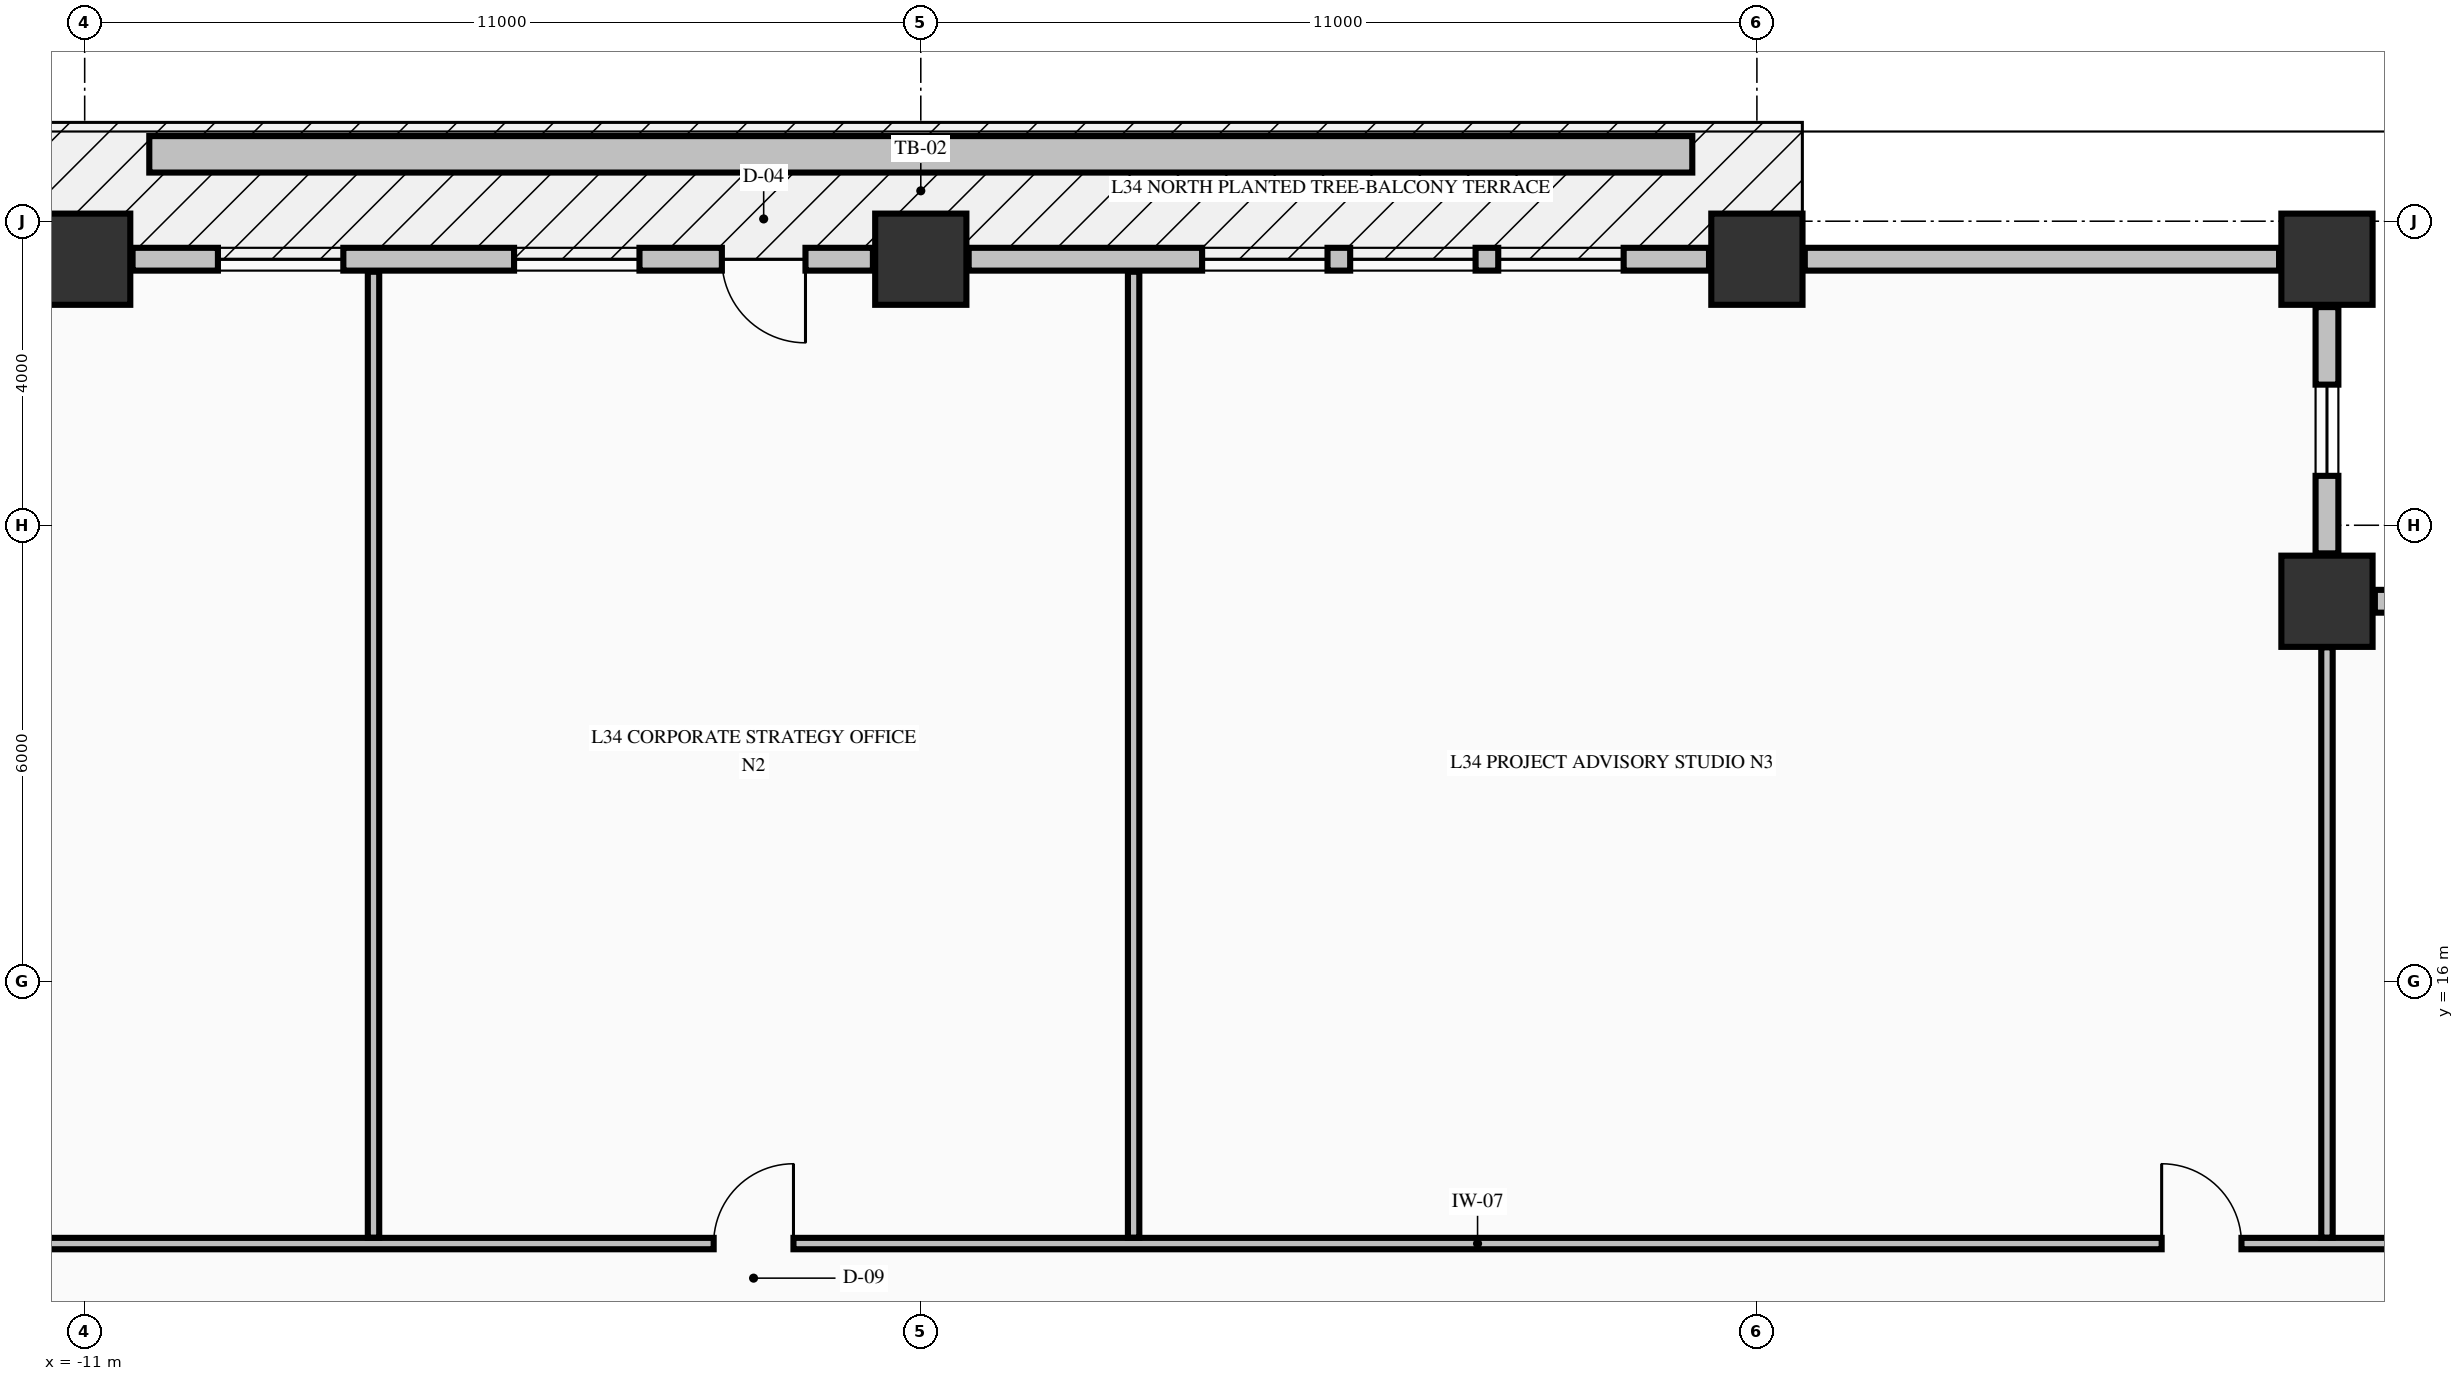
"""IFC4 building model, lengths in metres.
Left out: names, types, materials, properties, quantities, classifications, styles, units other than length and angle.
Written with IfcOpenShell. Run it as: python <this file> out.ifc"""

import sys

from ifc_helpers import new_model, si_unit, direction, frame, frame_2d, origin, origin_2d, place, context, subcontext, project, spatial, rectangle, extrude, element, fill, save


model = new_model("IFC4")
c1 = context("Model", 3, precision=1e-05, world=origin(), true_north=direction((0.0, 1.0)))
c2 = subcontext(c1, "Body", "Model", "MODEL_VIEW")
j1 = project(units=[si_unit("LENGTHUNIT", "METRE"), si_unit("PLANEANGLEUNIT", "RADIAN")], contexts=[c1])
p1 = place(None, origin())
s1 = spatial("IfcSite", under=j1, at=p1, CompositionType="ELEMENT")
p2 = place(p1, origin())
s2 = spatial("IfcBuilding", under=s1, at=p2, CompositionType="ELEMENT")
p3 = place(p2, frame((0.0, 0.0, 135.63)))
s3 = spatial("IfcBuildingStorey", under=s2, at=p3, CompositionType="ELEMENT", Elevation=135.63)
for number, where, z_axis, x_axis in (
    (1, (-11.0, 25.5, -0.25), (0.0, 0.0, 1.0), (1.0, 0.0, 0.0)),
    (2, (0.0, 25.5, -0.25), (0.0, 0.0, 1.0), (1.0, 0.0, 0.0)),
    (3, (11.0, 25.5, -0.25), (0.0, 0.0, 1.0), (1.0, 0.0, 0.0)),
    (4, (18.5, 25.5, -0.25), (0.0, 0.0, 1.0), (1.0, 0.0, 0.0)),
    (5, (18.5, 21.0, -0.25), (0.0, 0.0, 1.0), (1.0, 0.0, 0.0)),
):
    element("IfcColumn", number, at=place(p3, frame(where, z_axis=z_axis, x_axis=x_axis)), inside=s3, PredefinedType="COLUMN", context=c2, shape_type="SweptSolid", body=[
        extrude(rectangle(XDim=1.2, YDim=1.2, at=origin_2d()), origin(), (0.0, 0.0, 1.0), 3.57),
    ])
p4 = place(p3, frame((22.37, 21.0, 0.0), z_axis=(0.0, 0.0, 1.0), x_axis=(-1.0, 0.0, 0.0)))
e6 = element("IfcWall", 6, at=p4, inside=s3, PredefinedType="STANDARD", context=c2, shape_type="SweptSolid", body=[
    extrude(rectangle(XDim=3.24, YDim=0.3, at=frame_2d((1.62, 0.0))), origin(), (0.0, 0.0, 1.0), 2.712),
])
p5 = place(p4, frame((1.02, 0.0, 0.82)))
e7 = element("IfcOpeningElement", 7, at=p5, cuts=e6, PredefinedType="OPENING", context=c2, shape_type="SweptSolid", body=[
    extrude(rectangle(XDim=1.2, YDim=1.65, at=frame_2d((0.6, 0.825))), frame((0.0, 0.16, 0.0), z_axis=(0.0, -1.0, 0.0), x_axis=(1.0, 0.0, 0.0)), (0.0, 0.0, 1.0), 0.32),
])
p6 = place(p3, frame((18.5, 21.63, 0.0), z_axis=(0.0, 0.0, 1.0), x_axis=(0.0, 1.0, 0.0)))
e8 = element("IfcWall", 8, at=p6, inside=s3, PredefinedType="STANDARD", context=c2, shape_type="SweptSolid", body=[
    extrude(rectangle(XDim=3.24, YDim=0.3, at=frame_2d((1.62, 0.0))), origin(), (0.0, 0.0, 1.0), 2.712),
])
p7 = place(p6, frame((1.02, 0.0, 0.82)))
e9 = element("IfcOpeningElement", 9, at=p7, cuts=e8, PredefinedType="OPENING", context=c2, shape_type="SweptSolid", body=[
    extrude(rectangle(XDim=1.2, YDim=1.65, at=frame_2d((0.6, 0.825))), frame((0.0, 0.16, 0.0), z_axis=(0.0, -1.0, 0.0), x_axis=(1.0, 0.0, 0.0)), (0.0, 0.0, 1.0), 0.32),
])
p8 = place(p3, frame((-0.63, 25.5, 0.0), z_axis=(0.0, 0.0, 1.0), x_axis=(-1.0, 0.0, 0.0)))
e10 = element("IfcWall", 10, at=p8, inside=s3, PredefinedType="STANDARD", context=c2, shape_type="SweptSolid", body=[
    extrude(rectangle(XDim=9.74, YDim=0.3, at=frame_2d((4.87, 0.0))), origin(), (0.0, 0.0, 1.0), 2.712),
])
p9 = place(p8, frame((0.887, 0.0, 0.0)))
e11 = element("IfcOpeningElement", 11, at=p9, cuts=e10, PredefinedType="OPENING", context=c2, shape_type="SweptSolid", body=[
    extrude(rectangle(XDim=1.1, YDim=2.15, at=frame_2d((0.55, 1.075))), frame((0.0, 0.16, 0.0), z_axis=(0.0, -1.0, 0.0), x_axis=(1.0, 0.0, 0.0)), (0.0, 0.0, 1.0), 0.32),
])
p10 = place(p8, frame((3.071, 0.0, 0.8)))
e12 = element("IfcOpeningElement", 12, at=p10, cuts=e10, PredefinedType="OPENING", context=c2, shape_type="SweptSolid", body=[
    extrude(rectangle(XDim=1.65, YDim=1.7, at=frame_2d((0.825, 0.85))), frame((0.0, 0.16, 0.0), z_axis=(0.0, -1.0, 0.0), x_axis=(1.0, 0.0, 0.0)), (0.0, 0.0, 1.0), 0.32),
])
p11 = place(p8, frame((6.967, 0.0, 0.8)))
e13 = element("IfcOpeningElement", 13, at=p11, cuts=e10, PredefinedType="OPENING", context=c2, shape_type="SweptSolid", body=[
    extrude(rectangle(XDim=1.65, YDim=1.7, at=frame_2d((0.825, 0.85))), frame((0.0, 0.16, 0.0), z_axis=(0.0, -1.0, 0.0), x_axis=(1.0, 0.0, 0.0)), (0.0, 0.0, 1.0), 0.32),
])
p12 = place(p3, frame((10.37, 25.5, 0.0), z_axis=(0.0, 0.0, 1.0), x_axis=(-1.0, 0.0, 0.0)))
e14 = element("IfcWall", 14, at=p12, inside=s3, PredefinedType="STANDARD", context=c2, shape_type="SweptSolid", body=[
    extrude(rectangle(XDim=9.74, YDim=0.3, at=frame_2d((4.87, 0.0))), origin(), (0.0, 0.0, 1.0), 2.712),
])
p13 = place(p12, frame((1.123, 0.0, 0.8)))
e15 = element("IfcOpeningElement", 15, at=p13, cuts=e14, PredefinedType="OPENING", context=c2, shape_type="SweptSolid", body=[
    extrude(rectangle(XDim=1.65, YDim=1.7, at=frame_2d((0.825, 0.85))), frame((0.0, 0.16, 0.0), z_axis=(0.0, -1.0, 0.0), x_axis=(1.0, 0.0, 0.0)), (0.0, 0.0, 1.0), 0.32),
])
p14 = place(p12, frame((3.071, 0.0, 0.8)))
e16 = element("IfcOpeningElement", 16, at=p14, cuts=e14, PredefinedType="OPENING", context=c2, shape_type="SweptSolid", body=[
    extrude(rectangle(XDim=1.65, YDim=1.7, at=frame_2d((0.825, 0.85))), frame((0.0, 0.16, 0.0), z_axis=(0.0, -1.0, 0.0), x_axis=(1.0, 0.0, 0.0)), (0.0, 0.0, 1.0), 0.32),
])
p15 = place(p12, frame((5.019, 0.0, 0.8)))
e17 = element("IfcOpeningElement", 17, at=p15, cuts=e14, PredefinedType="OPENING", context=c2, shape_type="SweptSolid", body=[
    extrude(rectangle(XDim=1.65, YDim=1.7, at=frame_2d((0.825, 0.85))), frame((0.0, 0.16, 0.0), z_axis=(0.0, -1.0, 0.0), x_axis=(1.0, 0.0, 0.0)), (0.0, 0.0, 1.0), 0.32),
])
p16 = place(p3, frame((17.87, 25.5, 0.0), z_axis=(0.0, 0.0, 1.0), x_axis=(-1.0, 0.0, 0.0)))
e18 = element("IfcWall", 18, at=p16, inside=s3, PredefinedType="STANDARD", context=c2, shape_type="SweptSolid", body=[
    extrude(rectangle(XDim=6.24, YDim=0.3, at=frame_2d((3.12, 0.0))), origin(), (0.0, 0.0, 1.0), 2.712),
])
p17 = place(p3, frame((-27.835, 12.55, 0.0), z_axis=(0.0, 0.0, 1.0), x_axis=(1.0, 0.0, 0.0)))
e19 = element("IfcWall", 19, at=p17, inside=s3, PredefinedType="PARTITIONING", context=c2, shape_type="SweptSolid", body=[
    extrude(rectangle(XDim=50.67, YDim=0.15, at=frame_2d((25.335, 0.0))), origin(), (0.0, 0.0, 1.0), 3.32),
])
p18 = place(p17, frame((13.81, 0.0, 0.0)))
e20 = element("IfcOpeningElement", 20, at=p18, cuts=e19, PredefinedType="OPENING", context=c2, shape_type="SweptSolid", body=[
    extrude(rectangle(XDim=1.05, YDim=2.15, at=frame_2d((0.525, 1.075))), frame((0.0, 0.085, 0.0), z_axis=(0.0, -1.0, 0.0), x_axis=(1.0, 0.0, 0.0)), (0.0, 0.0, 1.0), 0.17),
])
p19 = place(p17, frame((25.11, 0.0, 0.0)))
e21 = element("IfcOpeningElement", 21, at=p19, cuts=e19, PredefinedType="OPENING", context=c2, shape_type="SweptSolid", body=[
    extrude(rectangle(XDim=1.05, YDim=2.15, at=frame_2d((0.525, 1.075))), frame((0.0, 0.085, 0.0), z_axis=(0.0, -1.0, 0.0), x_axis=(1.0, 0.0, 0.0)), (0.0, 0.0, 1.0), 0.17),
])
p20 = place(p17, frame((44.16, 0.0, 0.0)))
e22 = element("IfcOpeningElement", 22, at=p20, cuts=e19, PredefinedType="OPENING", context=c2, shape_type="SweptSolid", body=[
    extrude(rectangle(XDim=1.05, YDim=2.15, at=frame_2d((0.525, 1.075))), frame((0.0, 0.085, 0.0), z_axis=(0.0, -1.0, 0.0), x_axis=(1.0, 0.0, 0.0)), (0.0, 0.0, 1.0), 0.17),
])
for number, where, z_axis, x_axis in (
    (23, (-7.2, 12.628, 0.0), (0.0, 0.0, 1.0), (0.0, 1.0, 0.0)),
    (24, (2.8, 12.628, 0.0), (0.0, 0.0, 1.0), (0.0, 1.0, 0.0)),
):
    element("IfcWall", number, at=place(p3, frame(where, z_axis=z_axis, x_axis=x_axis)), inside=s3, PredefinedType="PARTITIONING", context=c2, shape_type="SweptSolid", body=[
        extrude(rectangle(XDim=12.707, YDim=0.15, at=frame_2d((6.354, 0.0))), origin(), (0.0, 0.0, 1.0), 3.32),
    ])
p21 = place(p3, frame((18.5, 12.628, 0.0), z_axis=(0.0, 0.0, 1.0), x_axis=(0.0, 1.0, 0.0)))
e25 = element("IfcWall", 25, at=p21, inside=s3, PredefinedType="PARTITIONING", context=c2, shape_type="SweptSolid", body=[
    extrude(rectangle(XDim=7.766, YDim=0.15, at=frame_2d((3.883, 0.0))), origin(), (0.0, 0.0, 1.0), 3.32),
])
p22 = place(p3, frame((-10.15, 26.88, -0.04), z_axis=(0.0, 0.0, 1.0), x_axis=(1.0, 0.0, 0.0)))
e26 = element("IfcWall", 26, at=p22, inside=s3, PredefinedType="PARAPET", context=c2, shape_type="SweptSolid", body=[
    extrude(rectangle(XDim=20.3, YDim=0.48, at=frame_2d((10.15, 0.0))), origin(), (0.0, 0.0, 1.0), 0.52),
])
p23 = place(p7, origin())
e27 = element("IfcWindow", 27, at=p23, inside=s3, PartitioningType="SINGLE_PANEL", PredefinedType="WINDOW", context=c2, shape_type="SweptSolid", body=[
    extrude(rectangle(XDim=1.2, YDim=1.65, at=frame_2d((0.6, 0.825))), frame((0.0, 0.03, 0.0), z_axis=(0.0, -1.0, 0.0), x_axis=(1.0, 0.0, 0.0)), (0.0, 0.0, 1.0), 0.06),
])
fill(e9, e27)
p24 = place(p9, origin())
e28 = element("IfcDoor", 28, at=p24, inside=s3, OperationType="SINGLE_SWING_LEFT", PredefinedType="DOOR", context=c2, shape_type="SweptSolid", body=[
    extrude(rectangle(XDim=1.1, YDim=2.15, at=frame_2d((0.55, 1.075))), frame((0.0, 0.025, 0.0), z_axis=(0.0, -1.0, 0.0), x_axis=(1.0, 0.0, 0.0)), (0.0, 0.0, 1.0), 0.05),
])
fill(e11, e28)
p25 = place(p10, origin())
e29 = element("IfcWindow", 29, at=p25, inside=s3, PartitioningType="SINGLE_PANEL", PredefinedType="WINDOW", context=c2, shape_type="SweptSolid", body=[
    extrude(rectangle(XDim=1.65, YDim=1.7, at=frame_2d((0.825, 0.85))), frame((0.0, 0.03, 0.0), z_axis=(0.0, -1.0, 0.0), x_axis=(1.0, 0.0, 0.0)), (0.0, 0.0, 1.0), 0.06),
])
fill(e12, e29)
p26 = place(p11, origin())
e30 = element("IfcWindow", 30, at=p26, inside=s3, PartitioningType="SINGLE_PANEL", PredefinedType="WINDOW", context=c2, shape_type="SweptSolid", body=[
    extrude(rectangle(XDim=1.65, YDim=1.7, at=frame_2d((0.825, 0.85))), frame((0.0, 0.03, 0.0), z_axis=(0.0, -1.0, 0.0), x_axis=(1.0, 0.0, 0.0)), (0.0, 0.0, 1.0), 0.06),
])
fill(e13, e30)
p27 = place(p13, origin())
e31 = element("IfcWindow", 31, at=p27, inside=s3, PartitioningType="SINGLE_PANEL", PredefinedType="WINDOW", context=c2, shape_type="SweptSolid", body=[
    extrude(rectangle(XDim=1.65, YDim=1.7, at=frame_2d((0.825, 0.85))), frame((0.0, 0.03, 0.0), z_axis=(0.0, -1.0, 0.0), x_axis=(1.0, 0.0, 0.0)), (0.0, 0.0, 1.0), 0.06),
])
fill(e15, e31)
p28 = place(p14, origin())
e32 = element("IfcWindow", 32, at=p28, inside=s3, PartitioningType="SINGLE_PANEL", PredefinedType="WINDOW", context=c2, shape_type="SweptSolid", body=[
    extrude(rectangle(XDim=1.65, YDim=1.7, at=frame_2d((0.825, 0.85))), frame((0.0, 0.03, 0.0), z_axis=(0.0, -1.0, 0.0), x_axis=(1.0, 0.0, 0.0)), (0.0, 0.0, 1.0), 0.06),
])
fill(e16, e32)
p29 = place(p15, origin())
e33 = element("IfcWindow", 33, at=p29, inside=s3, PartitioningType="SINGLE_PANEL", PredefinedType="WINDOW", context=c2, shape_type="SweptSolid", body=[
    extrude(rectangle(XDim=1.65, YDim=1.7, at=frame_2d((0.825, 0.85))), frame((0.0, 0.03, 0.0), z_axis=(0.0, -1.0, 0.0), x_axis=(1.0, 0.0, 0.0)), (0.0, 0.0, 1.0), 0.06),
])
fill(e17, e33)
p30 = place(p19, origin())
e34 = element("IfcDoor", 34, at=p30, inside=s3, OperationType="SINGLE_SWING_RIGHT", PredefinedType="DOOR", context=c2, shape_type="SweptSolid", body=[
    extrude(rectangle(XDim=1.05, YDim=2.15, at=frame_2d((0.525, 1.075))), frame((0.0, 0.025, 0.0), z_axis=(0.0, -1.0, 0.0), x_axis=(1.0, 0.0, 0.0)), (0.0, 0.0, 1.0), 0.05),
])
fill(e21, e34)
p31 = place(p20, origin())
e35 = element("IfcDoor", 35, at=p31, inside=s3, OperationType="SINGLE_SWING_LEFT", PredefinedType="DOOR", context=c2, shape_type="SweptSolid", body=[
    extrude(rectangle(XDim=1.05, YDim=2.15, at=frame_2d((0.525, 1.075))), frame((0.0, 0.025, 0.0), z_axis=(0.0, -1.0, 0.0), x_axis=(1.0, 0.0, 0.0)), (0.0, 0.0, 1.0), 0.05),
])
fill(e22, e35)
save(model, sys.argv[1])
